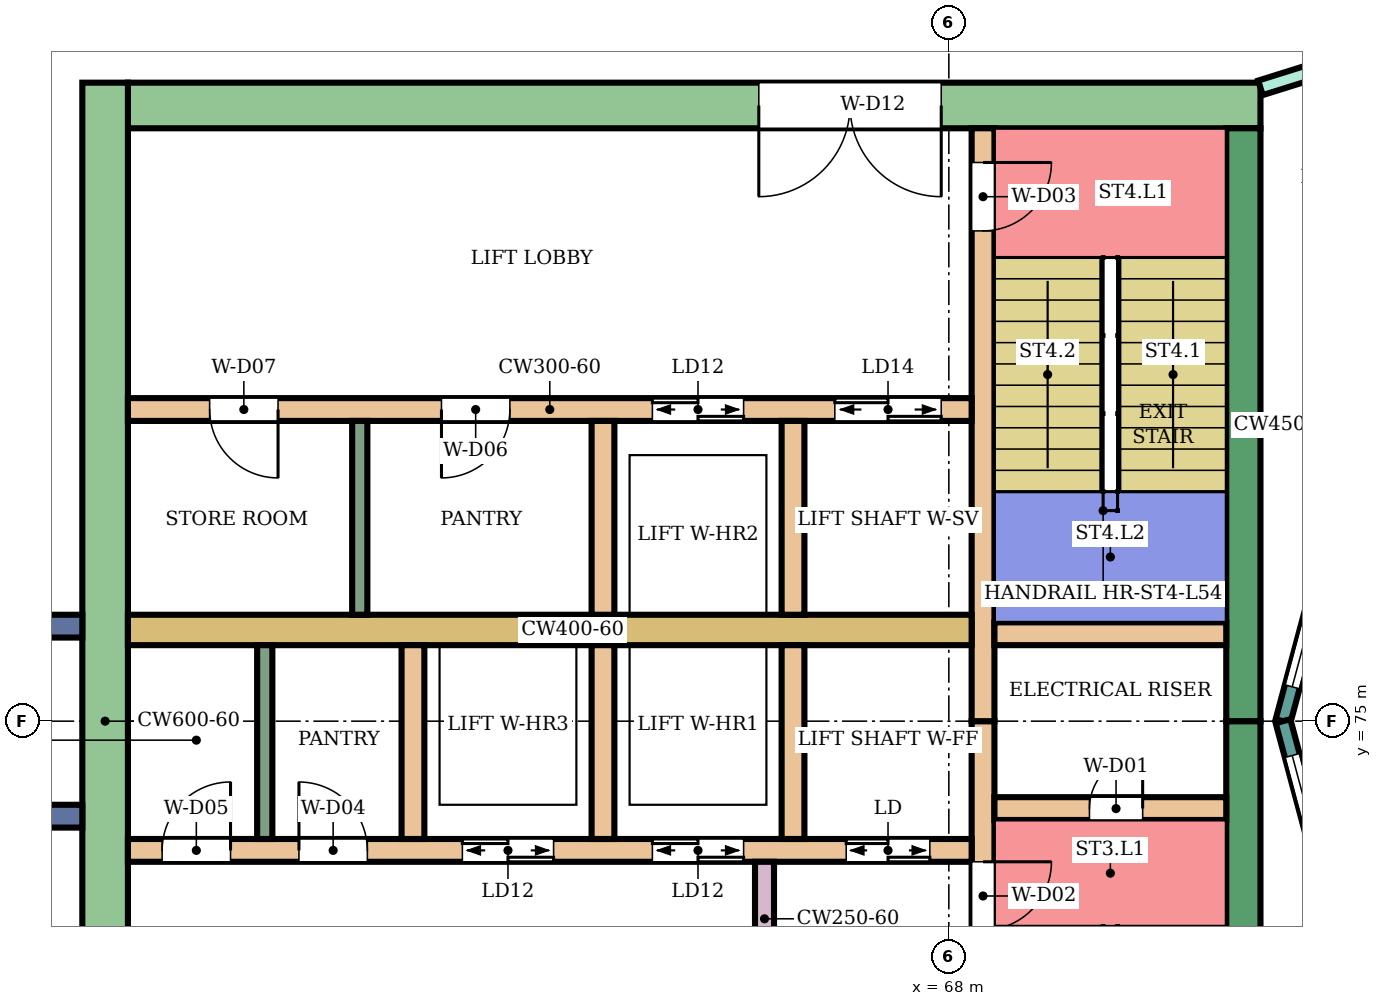
"""IFC4 building model, lengths in metres.
Left out: names, types, materials, properties, quantities, classifications, styles, units other than length and angle.
Written with IfcOpenShell. Run it as: python <this file> out.ifc"""

import sys

from ifc_helpers import new_model, si_unit, direction, frame, frame_2d, origin, place, context, subcontext, project, spatial, rectangle, extrude, element, fill, save


model = new_model("IFC4")
c1 = context("Model", 3, precision=1e-05, world=origin(), true_north=direction((0.0, 1.0)))
c2 = subcontext(c1, "Body", "Model", "MODEL_VIEW")
j1 = project(units=[si_unit("LENGTHUNIT", "METRE"), si_unit("PLANEANGLEUNIT", "RADIAN")], contexts=[c1])
p1 = place(None, origin())
s1 = spatial("IfcSite", under=j1, at=p1, CompositionType="ELEMENT")
p2 = place(p1, origin())
s2 = spatial("IfcBuilding", under=s1, at=p2, CompositionType="ELEMENT")
p3 = place(p2, frame((0.0, 0.0, 237.3)))
s3 = spatial("IfcBuildingStorey", under=s2, at=p3, CompositionType="ELEMENT", Elevation=237.3)
p4 = place(p3, frame((72.1, 83.1, 0.0), z_axis=(0.0, 0.0, 1.0), x_axis=(-1.0, 0.0, 0.0)))
e1 = element("IfcWall", 1, at=p4, inside=s3, PredefinedType="SHEAR", context=c2, shape_type="SweptSolid", body=[
    extrude(rectangle(XDim=14.9, YDim=0.6, at=frame_2d((7.45, 0.0))), origin(), (0.0, 0.0, 1.0), 3.88),
])
p5 = place(p4, frame((4.2, 0.0, 0.0)))
e2 = element("IfcOpeningElement", 2, at=p5, cuts=e1, PredefinedType="OPENING", context=c2, shape_type="SweptSolid", body=[
    extrude(rectangle(XDim=2.4, YDim=2.4, at=frame_2d((1.2, 1.2))), frame((0.0, 0.31, 0.0), z_axis=(0.0, -1.0, 0.0), x_axis=(1.0, 0.0, 0.0)), (0.0, 0.0, 1.0), 0.62),
])
for number, where, z_axis, x_axis in (
    (3, (71.875, 75.0, 0.0), (0.0, 0.0, 1.0), (0.0, -1.0, 0.0)),
    (4, (71.875, 82.8, 0.0), (0.0, 0.0, 1.0), (0.0, -1.0, 0.0)),
):
    element("IfcWall", number, at=place(p3, frame(where, z_axis=z_axis, x_axis=x_axis)), inside=s3, PredefinedType="SHEAR", context=c2, shape_type="SweptSolid", body=[
        extrude(rectangle(XDim=7.8, YDim=0.45, at=frame_2d((3.9, 0.0))), origin(), (0.0, 0.0, 1.0), 3.88),
    ])
p6 = place(p3, frame((56.9, 83.4, 0.0), z_axis=(0.0, 0.0, 1.0), x_axis=(0.0, -1.0, 0.0)))
e5 = element("IfcWall", 5, at=p6, inside=s3, PredefinedType="SHEAR", context=c2, shape_type="SweptSolid", body=[
    extrude(rectangle(XDim=16.8, YDim=0.6, at=frame_2d((8.4, 0.0))), origin(), (0.0, 0.0, 1.0), 3.88),
])
p7 = place(p3, frame((68.45, 75.0, 0.0), z_axis=(0.0, 0.0, 1.0), x_axis=(0.0, -1.0, 0.0)))
e6 = element("IfcWall", 6, at=p7, inside=s3, PredefinedType="SHEAR", context=c2, shape_type="SweptSolid", body=[
    extrude(rectangle(XDim=7.8, YDim=0.3, at=frame_2d((3.9, 0.0))), origin(), (0.0, 0.0, 1.0), 3.88),
])
p8 = place(p7, frame((1.85, 0.0, 0.0)))
e7 = element("IfcOpeningElement", 7, at=p8, cuts=e6, PredefinedType="OPENING", context=c2, shape_type="SweptSolid", body=[
    extrude(rectangle(XDim=0.9, YDim=2.1, at=frame_2d((0.45, 1.05))), frame((0.0, 0.16, 0.0), z_axis=(0.0, -1.0, 0.0), x_axis=(1.0, 0.0, 0.0)), (0.0, 0.0, 1.0), 0.32),
])
p9 = place(p3, frame((68.45, 82.8, 0.0), z_axis=(0.0, 0.0, 1.0), x_axis=(0.0, -1.0, 0.0)))
e8 = element("IfcWall", 8, at=p9, inside=s3, PredefinedType="SHEAR", context=c2, shape_type="SweptSolid", body=[
    extrude(rectangle(XDim=7.8, YDim=0.3, at=frame_2d((3.9, 0.0))), origin(), (0.0, 0.0, 1.0), 3.88),
])
p10 = place(p9, frame((0.45, 0.0, 0.0)))
e9 = element("IfcOpeningElement", 9, at=p10, cuts=e8, PredefinedType="OPENING", context=c2, shape_type="SweptSolid", body=[
    extrude(rectangle(XDim=0.9, YDim=2.1, at=frame_2d((0.45, 1.05))), frame((0.0, 0.16, 0.0), z_axis=(0.0, -1.0, 0.0), x_axis=(1.0, 0.0, 0.0)), (0.0, 0.0, 1.0), 0.32),
])
p11 = place(p3, frame((71.65, 73.85, 0.0), z_axis=(0.0, 0.0, 1.0), x_axis=(-1.0, 0.0, 0.0)))
e10 = element("IfcWall", 10, at=p11, inside=s3, PredefinedType="SHEAR", context=c2, shape_type="SweptSolid", body=[
    extrude(rectangle(XDim=3.05, YDim=0.3, at=frame_2d((1.525, 0.0))), origin(), (0.0, 0.0, 1.0), 3.88),
])
p12 = place(p11, frame((1.1, 0.0, 0.0)))
e11 = element("IfcOpeningElement", 11, at=p12, cuts=e10, PredefinedType="OPENING", context=c2, shape_type="SweptSolid", body=[
    extrude(rectangle(XDim=0.7, YDim=2.0, at=frame_2d((0.35, 1.0))), frame((0.0, 0.16, 0.0), z_axis=(0.0, -1.0, 0.0), x_axis=(1.0, 0.0, 0.0)), (0.0, 0.0, 1.0), 0.32),
])
p13 = place(p3, frame((71.65, 76.15, 0.0), z_axis=(0.0, 0.0, 1.0), x_axis=(-1.0, 0.0, 0.0)))
e12 = element("IfcWall", 12, at=p13, inside=s3, PredefinedType="SHEAR", context=c2, shape_type="SweptSolid", body=[
    extrude(rectangle(XDim=3.05, YDim=0.3, at=frame_2d((1.525, 0.0))), origin(), (0.0, 0.0, 1.0), 3.88),
])
p14 = place(p3, frame((68.3, 73.3, 0.0), z_axis=(0.0, 0.0, 1.0), x_axis=(-1.0, 0.0, 0.0)))
e13 = element("IfcWall", 13, at=p14, inside=s3, PredefinedType="SHEAR", context=c2, shape_type="SweptSolid", body=[
    extrude(rectangle(XDim=11.1, YDim=0.3, at=frame_2d((5.55, 0.0))), origin(), (0.0, 0.0, 1.0), 3.88),
])
p15 = place(p14, frame((0.55, 0.0, 0.0)))
e14 = element("IfcOpeningElement", 14, at=p15, cuts=e13, PredefinedType="OPENING", context=c2, shape_type="SweptSolid", body=[
    extrude(rectangle(XDim=1.1, YDim=2.1, at=frame_2d((0.55, 1.05))), frame((0.0, 0.16, 0.0), z_axis=(0.0, -1.0, 0.0), x_axis=(1.0, 0.0, 0.0)), (0.0, 0.0, 1.0), 0.32),
])
p16 = place(p14, frame((3.0, 0.0, 0.0)))
e15 = element("IfcOpeningElement", 15, at=p16, cuts=e13, PredefinedType="OPENING", context=c2, shape_type="SweptSolid", body=[
    extrude(rectangle(XDim=1.2, YDim=2.1, at=frame_2d((0.6, 1.05))), frame((0.0, 0.16, 0.0), z_axis=(0.0, -1.0, 0.0), x_axis=(1.0, 0.0, 0.0)), (0.0, 0.0, 1.0), 0.32),
])
p17 = place(p14, frame((5.5, 0.0, 0.0)))
e16 = element("IfcOpeningElement", 16, at=p17, cuts=e13, PredefinedType="OPENING", context=c2, shape_type="SweptSolid", body=[
    extrude(rectangle(XDim=1.2, YDim=2.1, at=frame_2d((0.6, 1.05))), frame((0.0, 0.16, 0.0), z_axis=(0.0, -1.0, 0.0), x_axis=(1.0, 0.0, 0.0)), (0.0, 0.0, 1.0), 0.32),
])
p18 = place(p14, frame((7.95, 0.0, 0.0)))
e17 = element("IfcOpeningElement", 17, at=p18, cuts=e13, PredefinedType="OPENING", context=c2, shape_type="SweptSolid", body=[
    extrude(rectangle(XDim=0.9, YDim=2.1, at=frame_2d((0.45, 1.05))), frame((0.0, 0.16, 0.0), z_axis=(0.0, -1.0, 0.0), x_axis=(1.0, 0.0, 0.0)), (0.0, 0.0, 1.0), 0.32),
])
p19 = place(p14, frame((9.75, 0.0, 0.0)))
e18 = element("IfcOpeningElement", 18, at=p19, cuts=e13, PredefinedType="OPENING", context=c2, shape_type="SweptSolid", body=[
    extrude(rectangle(XDim=0.9, YDim=2.1, at=frame_2d((0.45, 1.05))), frame((0.0, 0.16, 0.0), z_axis=(0.0, -1.0, 0.0), x_axis=(1.0, 0.0, 0.0)), (0.0, 0.0, 1.0), 0.32),
])
p20 = place(p3, frame((68.3, 76.2, 0.0), z_axis=(0.0, 0.0, 1.0), x_axis=(-1.0, 0.0, 0.0)))
e19 = element("IfcWall", 19, at=p20, inside=s3, PredefinedType="SHEAR", context=c2, shape_type="SweptSolid", body=[
    extrude(rectangle(XDim=11.1, YDim=0.4, at=frame_2d((5.55, 0.0))), origin(), (0.0, 0.0, 1.0), 3.88),
])
p21 = place(p3, frame((68.3, 79.1, 0.0), z_axis=(0.0, 0.0, 1.0), x_axis=(-1.0, 0.0, 0.0)))
e20 = element("IfcWall", 20, at=p21, inside=s3, PredefinedType="SHEAR", context=c2, shape_type="SweptSolid", body=[
    extrude(rectangle(XDim=11.1, YDim=0.3, at=frame_2d((5.55, 0.0))), origin(), (0.0, 0.0, 1.0), 3.88),
])
p22 = place(p21, frame((0.4, 0.0, 0.0)))
e21 = element("IfcOpeningElement", 21, at=p22, cuts=e20, PredefinedType="OPENING", context=c2, shape_type="SweptSolid", body=[
    extrude(rectangle(XDim=1.4, YDim=2.1, at=frame_2d((0.7, 1.05))), frame((0.0, 0.16, 0.0), z_axis=(0.0, -1.0, 0.0), x_axis=(1.0, 0.0, 0.0)), (0.0, 0.0, 1.0), 0.32),
])
p23 = place(p21, frame((3.0, 0.0, 0.0)))
e22 = element("IfcOpeningElement", 22, at=p23, cuts=e20, PredefinedType="OPENING", context=c2, shape_type="SweptSolid", body=[
    extrude(rectangle(XDim=1.2, YDim=2.1, at=frame_2d((0.6, 1.05))), frame((0.0, 0.16, 0.0), z_axis=(0.0, -1.0, 0.0), x_axis=(1.0, 0.0, 0.0)), (0.0, 0.0, 1.0), 0.32),
])
p24 = place(p21, frame((6.075, 0.0, 0.0)))
e23 = element("IfcOpeningElement", 23, at=p24, cuts=e20, PredefinedType="OPENING", context=c2, shape_type="SweptSolid", body=[
    extrude(rectangle(XDim=0.9, YDim=2.1, at=frame_2d((0.45, 1.05))), frame((0.0, 0.16, 0.0), z_axis=(0.0, -1.0, 0.0), x_axis=(1.0, 0.0, 0.0)), (0.0, 0.0, 1.0), 0.32),
])
p25 = place(p21, frame((9.125, 0.0, 0.0)))
e24 = element("IfcOpeningElement", 24, at=p25, cuts=e20, PredefinedType="OPENING", context=c2, shape_type="SweptSolid", body=[
    extrude(rectangle(XDim=0.9, YDim=2.1, at=frame_2d((0.45, 1.05))), frame((0.0, 0.16, 0.0), z_axis=(0.0, -1.0, 0.0), x_axis=(1.0, 0.0, 0.0)), (0.0, 0.0, 1.0), 0.32),
])
for number, where, z_axis, x_axis in (
    (25, (65.95, 76.0, 0.0), (0.0, 0.0, 1.0), (0.0, -1.0, 0.0)),
    (26, (63.45, 76.0, 0.0), (0.0, 0.0, 1.0), (0.0, -1.0, 0.0)),
    (27, (60.95, 76.0, 0.0), (0.0, 0.0, 1.0), (0.0, -1.0, 0.0)),
    (28, (65.95, 78.95, 0.0), (0.0, 0.0, 1.0), (0.0, -1.0, 0.0)),
    (29, (63.45, 78.95, 0.0), (0.0, 0.0, 1.0), (0.0, -1.0, 0.0)),
):
    element("IfcWall", number, at=place(p3, frame(where, z_axis=z_axis, x_axis=x_axis)), inside=s3, PredefinedType="SHEAR", context=c2, shape_type="SweptSolid", body=[
        extrude(rectangle(XDim=2.55, YDim=0.3, at=frame_2d((1.275, 0.0))), origin(), (0.0, 0.0, 1.0), 3.88),
    ])
p26 = place(p3, frame((65.575, 73.15, 0.0), z_axis=(0.0, 0.0, 1.0), x_axis=(0.0, -1.0, 0.0)))
e30 = element("IfcWall", 30, at=p26, inside=s3, PredefinedType="SHEAR", context=c2, shape_type="SweptSolid", body=[
    extrude(rectangle(XDim=1.5, YDim=0.25, at=frame_2d((0.75, 0.0))), origin(), (0.0, 0.0, 1.0), 3.88),
])
for number, where, z_axis, x_axis in (
    (31, (56.6, 76.25, 0.0), (0.0, 0.0, 1.0), (-1.0, 0.0, 0.0)),
    (32, (56.6, 73.75, 0.0), (0.0, 0.0, 1.0), (-1.0, 0.0, 0.0)),
):
    element("IfcWall", number, at=place(p3, frame(where, z_axis=z_axis, x_axis=x_axis)), inside=s3, PredefinedType="NOTDEFINED", context=c2, shape_type="SweptSolid", body=[
        extrude(rectangle(XDim=2.416, YDim=0.3, at=frame_2d((1.208, 0.0))), origin(), (0.0, 0.0, 1.0), 4.2),
    ])
p27 = place(p3, frame((73.415, 78.802, 0.0), z_axis=(0.0, 0.0, 1.0), x_axis=(-0.258789828301, -0.965933654434, 0.0)))
e33 = element("IfcWall", 33, at=p27, inside=s3, PredefinedType="NOTDEFINED", context=c2, shape_type="SweptSolid", body=[
    extrude(rectangle(XDim=3.936, YDim=0.2, at=frame_2d((1.968, 0.0))), origin(), (0.0, 0.0, 1.0), 4.2),
])
p28 = place(p27, frame((0.468, 0.0, 0.9)))
e34 = element("IfcOpeningElement", 34, at=p28, cuts=e33, PredefinedType="OPENING", context=c2, shape_type="SweptSolid", body=[
    extrude(rectangle(XDim=3.0, YDim=2.3, at=frame_2d((1.5, 1.15))), frame((0.0, 0.11, 0.0), z_axis=(0.0, -1.0, 0.0), x_axis=(1.0, 0.0, 0.0)), (0.0, 0.0, 1.0), 0.22),
])
p29 = place(p3, frame((72.396, 75.0, 0.0), z_axis=(0.0, 0.0, 1.0), x_axis=(0.258789828301, -0.965933654434, 0.0)))
e35 = element("IfcWall", 35, at=p29, inside=s3, PredefinedType="NOTDEFINED", context=c2, shape_type="SweptSolid", body=[
    extrude(rectangle(XDim=3.936, YDim=0.2, at=frame_2d((1.968, 0.0))), origin(), (0.0, 0.0, 1.0), 4.2),
])
p30 = place(p29, frame((0.468, 0.0, 0.9)))
e36 = element("IfcOpeningElement", 36, at=p30, cuts=e35, PredefinedType="OPENING", context=c2, shape_type="SweptSolid", body=[
    extrude(rectangle(XDim=3.0, YDim=2.3, at=frame_2d((1.5, 1.15))), frame((0.0, 0.11, 0.0), z_axis=(0.0, -1.0, 0.0), x_axis=(1.0, 0.0, 0.0)), (0.0, 0.0, 1.0), 0.22),
])
p31 = place(p3, frame((72.1, 83.332, 0.0), z_axis=(0.0, 0.0, 1.0), x_axis=(0.954233106619, 0.299063836383, 0.0)))
e37 = element("IfcWall", 37, at=p31, inside=s3, PredefinedType="PARTITIONING", context=c2, shape_type="SweptSolid", body=[
    extrude(rectangle(XDim=2.414, YDim=0.2, at=frame_2d((1.207, 0.0))), origin(), (0.0, 0.0, 1.0), 3.75),
])
p32 = place(p31, frame((0.762, 0.0, 0.0)))
e38 = element("IfcOpeningElement", 38, at=p32, cuts=e37, PredefinedType="OPENING", context=c2, shape_type="SweptSolid", body=[
    extrude(rectangle(XDim=0.9, YDim=2.1, at=frame_2d((0.45, 1.05))), frame((0.0, 0.11, 0.0), z_axis=(0.0, -1.0, 0.0), x_axis=(1.0, 0.0, 0.0)), (0.0, 0.0, 1.0), 0.22),
])
for number, where, z_axis, x_axis in (
    (39, (59.0, 76.0, 0.0), (0.0, 0.0, 1.0), (0.0, -1.0, 0.0)),
    (40, (60.25, 78.95, 0.0), (0.0, 0.0, 1.0), (0.0, -1.0, 0.0)),
):
    element("IfcWall", number, at=place(p3, frame(where, z_axis=z_axis, x_axis=x_axis)), inside=s3, PredefinedType="PARTITIONING", context=c2, shape_type="SweptSolid", body=[
        extrude(rectangle(XDim=2.55, YDim=0.2, at=frame_2d((1.275, 0.0))), origin(), (0.0, 0.0, 1.0), 3.88),
    ])
p33 = place(p28, origin())
e41 = element("IfcWindow", 41, at=p33, inside=s3, PartitioningType="SINGLE_PANEL", PredefinedType="WINDOW", context=c2, shape_type="SweptSolid", body=[
    extrude(rectangle(XDim=3.0, YDim=2.3, at=frame_2d((1.5, 1.15))), frame((0.0, 0.03, 0.0), z_axis=(0.0, -1.0, 0.0), x_axis=(1.0, 0.0, 0.0)), (0.0, 0.0, 1.0), 0.06),
])
fill(e34, e41)
p34 = place(p30, origin())
e42 = element("IfcWindow", 42, at=p34, inside=s3, PartitioningType="SINGLE_PANEL", PredefinedType="WINDOW", context=c2, shape_type="SweptSolid", body=[
    extrude(rectangle(XDim=3.0, YDim=2.3, at=frame_2d((1.5, 1.15))), frame((0.0, 0.03, 0.0), z_axis=(0.0, -1.0, 0.0), x_axis=(1.0, 0.0, 0.0)), (0.0, 0.0, 1.0), 0.06),
])
fill(e36, e42)
p35 = place(p12, frame((0.7, 0.0, 0.0), z_axis=(0.0, 0.0, 1.0), x_axis=(-1.0, 0.0, 0.0)))
e43 = element("IfcDoor", 43, at=p35, inside=s3, OperationType="SINGLE_SWING_RIGHT", PredefinedType="DOOR", context=c2, shape_type="SweptSolid", body=[
    extrude(rectangle(XDim=0.7, YDim=2.0, at=frame_2d((0.35, 1.0))), frame((0.0, 0.025, 0.0), z_axis=(0.0, -1.0, 0.0), x_axis=(1.0, 0.0, 0.0)), (0.0, 0.0, 1.0), 0.05),
])
fill(e11, e43)
p36 = place(p8, origin())
e44 = element("IfcDoor", 44, at=p36, inside=s3, OperationType="SINGLE_SWING_LEFT", PredefinedType="DOOR", context=c2, shape_type="SweptSolid", body=[
    extrude(rectangle(XDim=0.9, YDim=2.1, at=frame_2d((0.45, 1.05))), frame((0.0, 0.025, 0.0), z_axis=(0.0, -1.0, 0.0), x_axis=(1.0, 0.0, 0.0)), (0.0, 0.0, 1.0), 0.05),
])
fill(e7, e44)
p37 = place(p10, origin())
e45 = element("IfcDoor", 45, at=p37, inside=s3, OperationType="SINGLE_SWING_LEFT", PredefinedType="DOOR", context=c2, shape_type="SweptSolid", body=[
    extrude(rectangle(XDim=0.9, YDim=2.1, at=frame_2d((0.45, 1.05))), frame((0.0, 0.025, 0.0), z_axis=(0.0, -1.0, 0.0), x_axis=(1.0, 0.0, 0.0)), (0.0, 0.0, 1.0), 0.05),
])
fill(e9, e45)
p38 = place(p15, origin())
e46 = element("IfcDoor", 46, at=p38, inside=s3, OperationType="DOUBLE_DOOR_SLIDING", PredefinedType="DOOR", context=c2, shape_type="SweptSolid", body=[
    extrude(rectangle(XDim=1.1, YDim=2.1, at=frame_2d((0.55, 1.05))), frame((0.0, 0.025, 0.0), z_axis=(0.0, -1.0, 0.0), x_axis=(1.0, 0.0, 0.0)), (0.0, 0.0, 1.0), 0.05),
])
fill(e14, e46)
p39 = place(p16, origin())
e47 = element("IfcDoor", 47, at=p39, inside=s3, OperationType="DOUBLE_DOOR_SLIDING", PredefinedType="DOOR", context=c2, shape_type="SweptSolid", body=[
    extrude(rectangle(XDim=1.2, YDim=2.1, at=frame_2d((0.6, 1.05))), frame((0.0, 0.025, 0.0), z_axis=(0.0, -1.0, 0.0), x_axis=(1.0, 0.0, 0.0)), (0.0, 0.0, 1.0), 0.05),
])
fill(e15, e47)
p40 = place(p17, origin())
e48 = element("IfcDoor", 48, at=p40, inside=s3, OperationType="DOUBLE_DOOR_SLIDING", PredefinedType="DOOR", context=c2, shape_type="SweptSolid", body=[
    extrude(rectangle(XDim=1.2, YDim=2.1, at=frame_2d((0.6, 1.05))), frame((0.0, 0.025, 0.0), z_axis=(0.0, -1.0, 0.0), x_axis=(1.0, 0.0, 0.0)), (0.0, 0.0, 1.0), 0.05),
])
fill(e16, e48)
p41 = place(p18, frame((0.9, 0.0, 0.0), z_axis=(0.0, 0.0, 1.0), x_axis=(-1.0, 0.0, 0.0)))
e49 = element("IfcDoor", 49, at=p41, inside=s3, OperationType="SINGLE_SWING_LEFT", PredefinedType="DOOR", context=c2, shape_type="SweptSolid", body=[
    extrude(rectangle(XDim=0.9, YDim=2.1, at=frame_2d((0.45, 1.05))), frame((0.0, 0.025, 0.0), z_axis=(0.0, -1.0, 0.0), x_axis=(1.0, 0.0, 0.0)), (0.0, 0.0, 1.0), 0.05),
])
fill(e17, e49)
p42 = place(p19, frame((0.9, 0.0, 0.0), z_axis=(0.0, 0.0, 1.0), x_axis=(-1.0, 0.0, 0.0)))
e50 = element("IfcDoor", 50, at=p42, inside=s3, OperationType="SINGLE_SWING_RIGHT", PredefinedType="DOOR", context=c2, shape_type="SweptSolid", body=[
    extrude(rectangle(XDim=0.9, YDim=2.1, at=frame_2d((0.45, 1.05))), frame((0.0, 0.025, 0.0), z_axis=(0.0, -1.0, 0.0), x_axis=(1.0, 0.0, 0.0)), (0.0, 0.0, 1.0), 0.05),
])
fill(e18, e50)
p43 = place(p22, origin())
e51 = element("IfcDoor", 51, at=p43, inside=s3, OperationType="DOUBLE_DOOR_SLIDING", PredefinedType="DOOR", context=c2, shape_type="SweptSolid", body=[
    extrude(rectangle(XDim=1.4, YDim=2.1, at=frame_2d((0.7, 1.05))), frame((0.0, 0.025, 0.0), z_axis=(0.0, -1.0, 0.0), x_axis=(1.0, 0.0, 0.0)), (0.0, 0.0, 1.0), 0.05),
])
fill(e21, e51)
p44 = place(p23, origin())
e52 = element("IfcDoor", 52, at=p44, inside=s3, OperationType="DOUBLE_DOOR_SLIDING", PredefinedType="DOOR", context=c2, shape_type="SweptSolid", body=[
    extrude(rectangle(XDim=1.2, YDim=2.1, at=frame_2d((0.6, 1.05))), frame((0.0, 0.025, 0.0), z_axis=(0.0, -1.0, 0.0), x_axis=(1.0, 0.0, 0.0)), (0.0, 0.0, 1.0), 0.05),
])
fill(e22, e52)
p45 = place(p24, origin())
e53 = element("IfcDoor", 53, at=p45, inside=s3, OperationType="SINGLE_SWING_RIGHT", PredefinedType="DOOR", context=c2, shape_type="SweptSolid", body=[
    extrude(rectangle(XDim=0.9, YDim=2.1, at=frame_2d((0.45, 1.05))), frame((0.0, 0.025, 0.0), z_axis=(0.0, -1.0, 0.0), x_axis=(1.0, 0.0, 0.0)), (0.0, 0.0, 1.0), 0.05),
])
fill(e23, e53)
p46 = place(p25, origin())
e54 = element("IfcDoor", 54, at=p46, inside=s3, OperationType="SINGLE_SWING_LEFT", PredefinedType="DOOR", context=c2, shape_type="SweptSolid", body=[
    extrude(rectangle(XDim=0.9, YDim=2.1, at=frame_2d((0.45, 1.05))), frame((0.0, 0.025, 0.0), z_axis=(0.0, -1.0, 0.0), x_axis=(1.0, 0.0, 0.0)), (0.0, 0.0, 1.0), 0.05),
])
fill(e24, e54)
p47 = place(p5, origin())
e55 = element("IfcDoor", 55, at=p47, inside=s3, OperationType="DOUBLE_DOOR_SINGLE_SWING", PredefinedType="DOOR", context=c2, shape_type="SweptSolid", body=[
    extrude(rectangle(XDim=2.4, YDim=2.4, at=frame_2d((1.2, 1.2))), frame((0.0, 0.025, 0.0), z_axis=(0.0, -1.0, 0.0), x_axis=(1.0, 0.0, 0.0)), (0.0, 0.0, 1.0), 0.05),
])
fill(e2, e55)
save(model, sys.argv[1])
